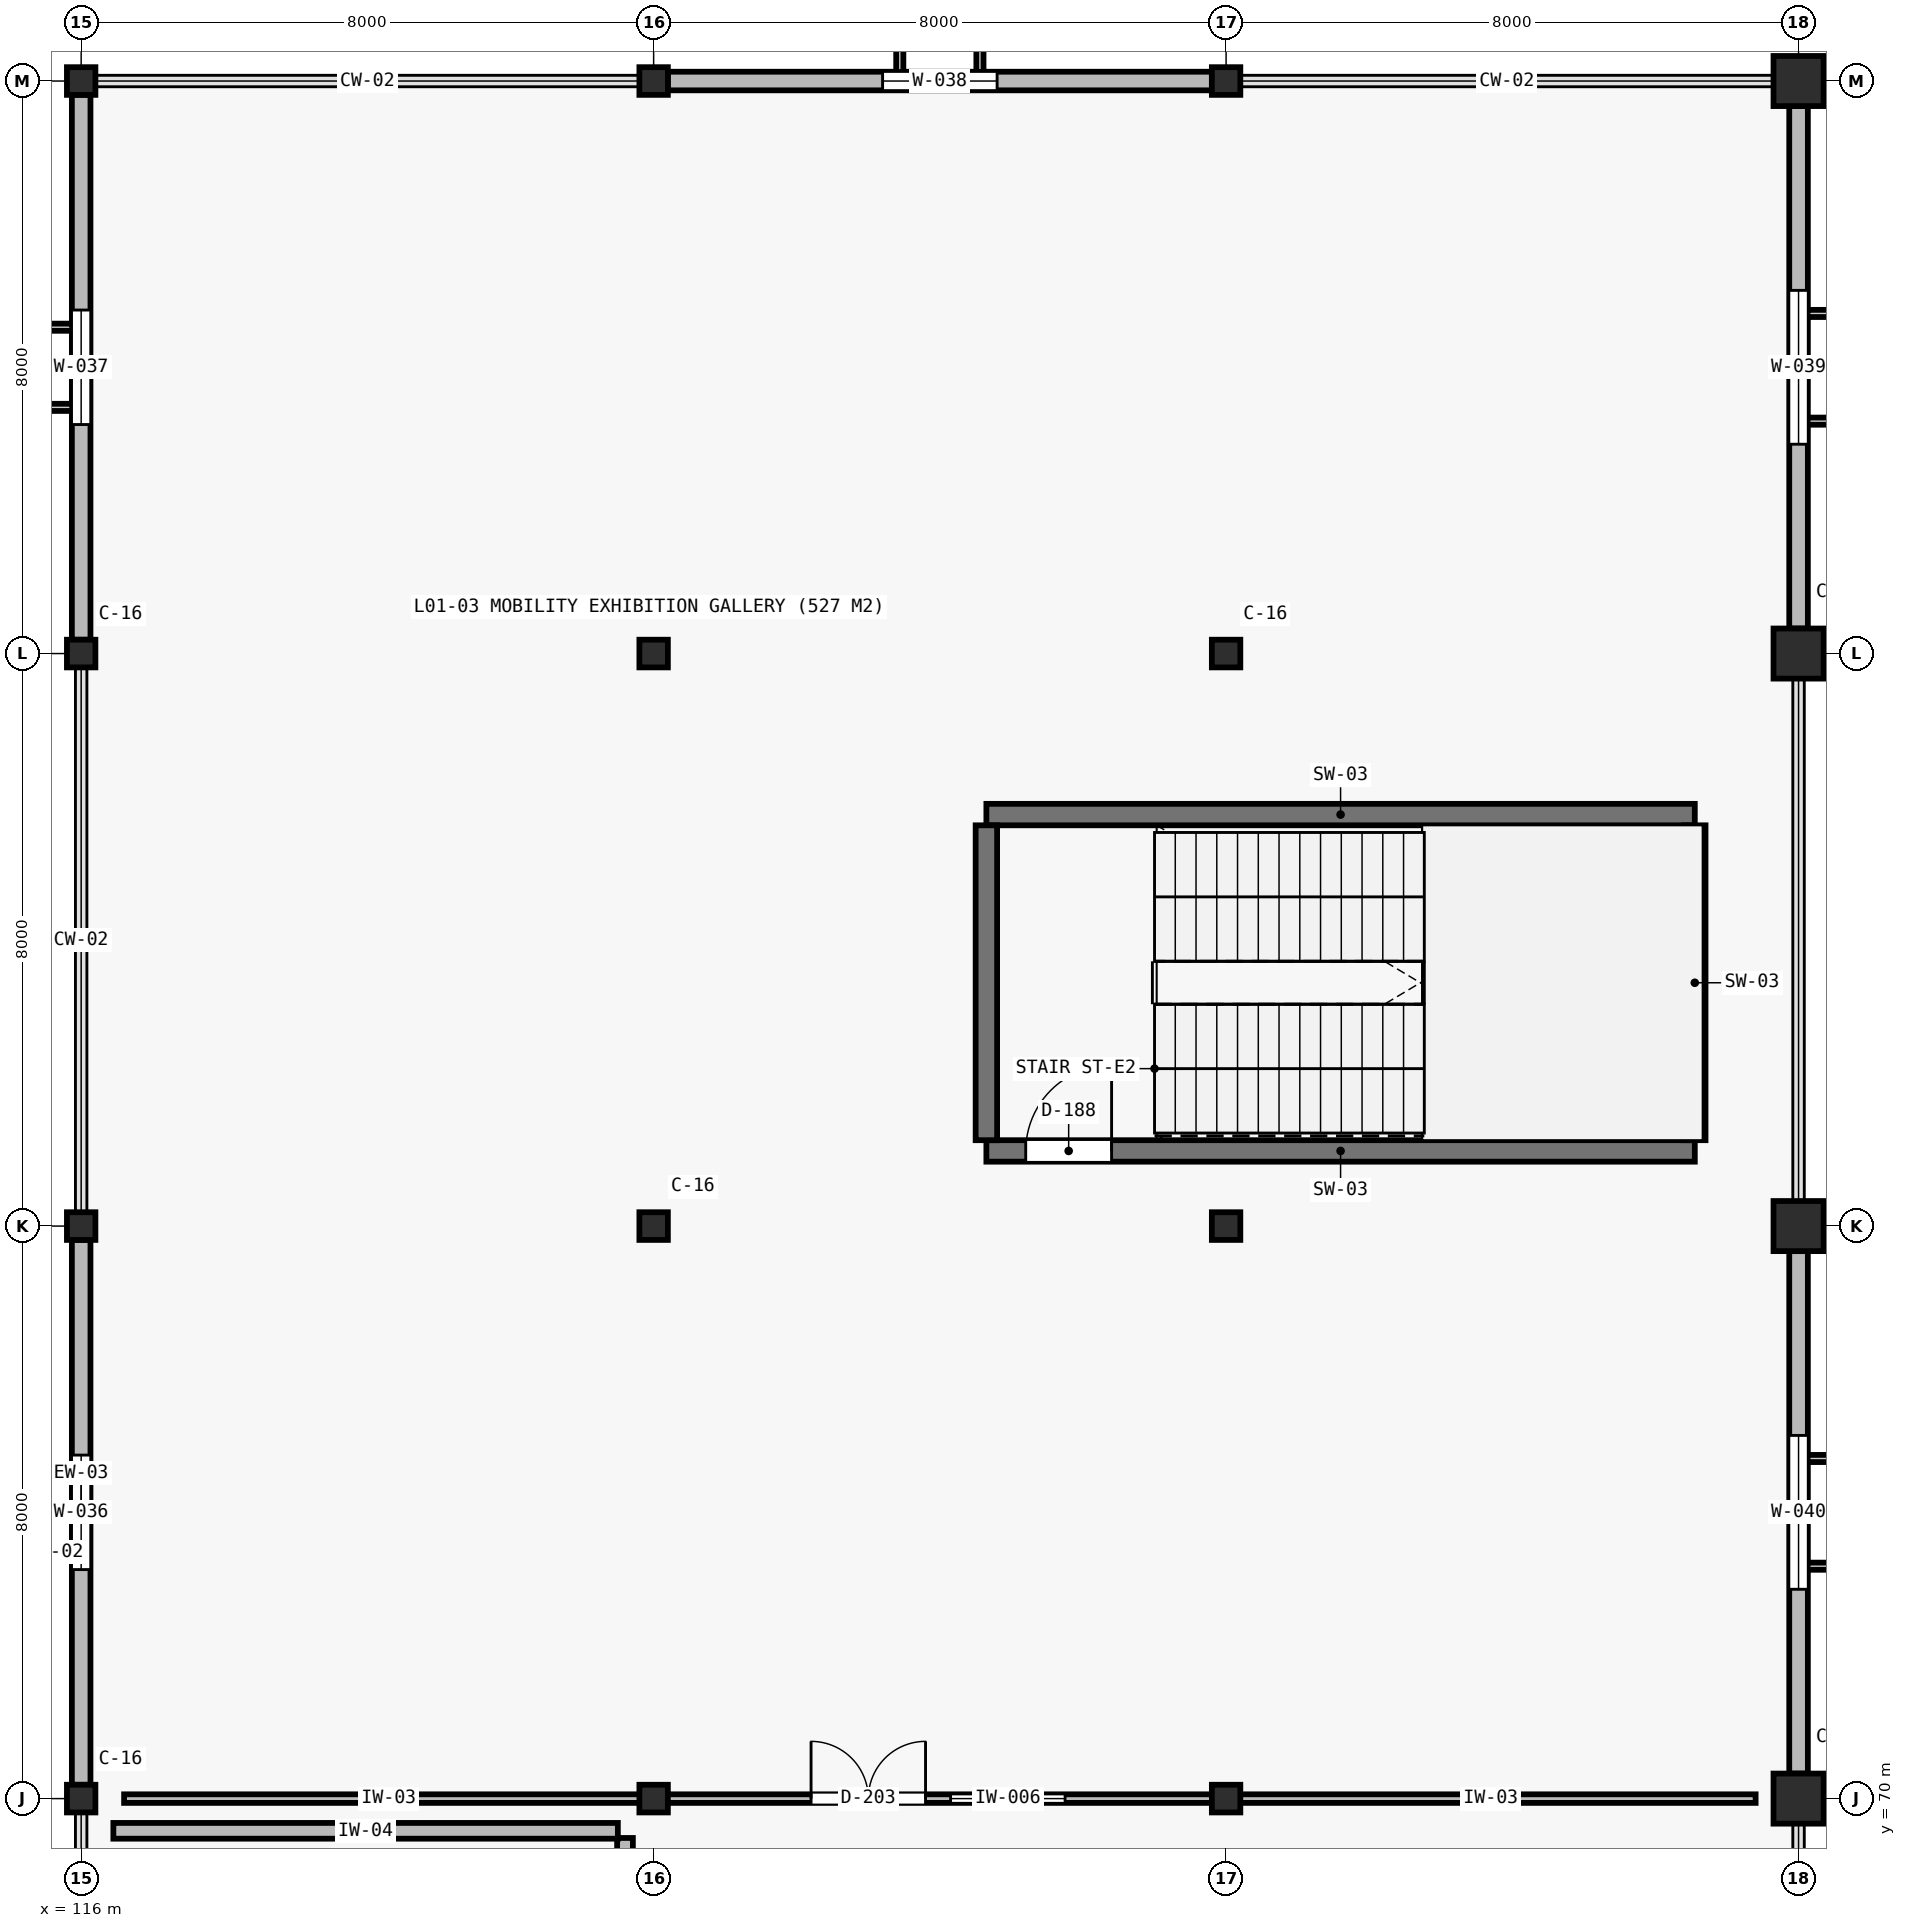
"""IFC4 building model, lengths in metres.
Left out: names, types, materials, properties, quantities, classifications, styles, units other than length and angle.
Written with IfcOpenShell. Run it as: python <this file> out.ifc"""

import sys

from ifc_helpers import new_model, si_unit, direction, frame, frame_2d, origin, origin_2d, place, context, subcontext, project, spatial, rectangle, i_section, extrude, element, fill, save


model = new_model("IFC4")
c1 = context("Model", 3, precision=1e-05, world=origin(), true_north=direction((0.0, 1.0)))
c2 = subcontext(c1, "Body", "Model", "MODEL_VIEW")
j1 = project(units=[si_unit("LENGTHUNIT", "METRE"), si_unit("PLANEANGLEUNIT", "RADIAN")], contexts=[c1])
p1 = place(None, origin())
s1 = spatial("IfcSite", under=j1, at=p1, CompositionType="ELEMENT")
p2 = place(p1, origin())
s2 = spatial("IfcBuilding", under=s1, at=p2, CompositionType="ELEMENT")
p3 = place(p2, frame((0.0, 0.0, 6.3)))
s3 = spatial("IfcBuildingStorey", under=s2, at=p3, CompositionType="ELEMENT", Elevation=6.3)
for number, where, z_axis, x_axis in (
    (1, (116.0, 70.0, 0.0), (0.0, 0.0, 1.0), (1.0, 0.0, 0.0)),
    (2, (116.0, 78.0, 0.0), (0.0, 0.0, 1.0), (1.0, 0.0, 0.0)),
    (3, (116.0, 86.0, 0.0), (0.0, 0.0, 1.0), (1.0, 0.0, 0.0)),
    (4, (116.0, 94.0, 0.0), (0.0, 0.0, 1.0), (1.0, 0.0, 0.0)),
    (5, (124.0, 70.0, 0.0), (0.0, 0.0, 1.0), (1.0, 0.0, 0.0)),
    (6, (124.0, 78.0, 0.0), (0.0, 0.0, 1.0), (1.0, 0.0, 0.0)),
    (7, (124.0, 86.0, 0.0), (0.0, 0.0, 1.0), (1.0, 0.0, 0.0)),
    (8, (124.0, 94.0, 0.0), (0.0, 0.0, 1.0), (1.0, 0.0, 0.0)),
    (9, (132.0, 70.0, 0.0), (0.0, 0.0, 1.0), (1.0, 0.0, 0.0)),
    (10, (132.0, 78.0, 0.0), (0.0, 0.0, 1.0), (1.0, 0.0, 0.0)),
    (11, (132.0, 86.0, 0.0), (0.0, 0.0, 1.0), (1.0, 0.0, 0.0)),
    (12, (132.0, 94.0, 0.0), (0.0, 0.0, 1.0), (1.0, 0.0, 0.0)),
):
    element("IfcColumn", number, at=place(p3, frame(where, z_axis=z_axis, x_axis=x_axis)), inside=s3, PredefinedType="COLUMN", context=c2, shape_type="SweptSolid", body=[
        extrude(i_section(OverallWidth=0.398, OverallDepth=0.387, WebThickness=0.021, FlangeThickness=0.033, at=origin_2d()), origin(), (0.0, 0.0, 1.0), 4.6),
    ])
for number, where, z_axis, x_axis in (
    (13, (140.0, 70.0, 0.0), (0.0, 0.0, 1.0), (1.0, 0.0, 0.0)),
    (14, (140.0, 78.0, 0.0), (0.0, 0.0, 1.0), (1.0, 0.0, 0.0)),
    (15, (140.0, 86.0, 0.0), (0.0, 0.0, 1.0), (1.0, 0.0, 0.0)),
    (16, (140.0, 94.0, 0.0), (0.0, 0.0, 1.0), (1.0, 0.0, 0.0)),
):
    element("IfcColumn", number, at=place(p3, frame(where, z_axis=z_axis, x_axis=x_axis)), inside=s3, PredefinedType="COLUMN", context=c2, shape_type="SweptSolid", body=[
        extrude(rectangle(XDim=0.7, YDim=0.7, at=origin_2d()), origin(), (0.0, 0.0, 1.0), 4.6),
    ])
p4 = place(p3, frame((128.65, 83.75, 0.0), z_axis=(0.0, 0.0, 1.0), x_axis=(1.0, 0.0, 0.0)))
e17 = element("IfcWall", 17, at=p4, inside=s3, PredefinedType="SHEAR", context=c2, shape_type="SweptSolid", body=[
    extrude(rectangle(XDim=9.9, YDim=0.3, at=frame_2d((4.95, 0.0))), origin(), (0.0, 0.0, 1.0), 4.6),
])
p5 = place(p3, frame((128.65, 79.05, 0.0), z_axis=(0.0, 0.0, 1.0), x_axis=(1.0, 0.0, 0.0)))
e18 = element("IfcWall", 18, at=p5, inside=s3, PredefinedType="SHEAR", context=c2, shape_type="SweptSolid", body=[
    extrude(rectangle(XDim=9.9, YDim=0.3, at=frame_2d((4.95, 0.0))), origin(), (0.0, 0.0, 1.0), 4.6),
])
p6 = place(p5, frame((0.55, 0.0, 0.0)))
e19 = element("IfcOpeningElement", 19, at=p6, cuts=e18, PredefinedType="OPENING", context=c2, shape_type="SweptSolid", body=[
    extrude(rectangle(XDim=1.2, YDim=2.2, at=frame_2d((0.6, 1.1))), frame((0.0, 0.16, 0.0), z_axis=(0.0, -1.0, 0.0), x_axis=(1.0, 0.0, 0.0)), (0.0, 0.0, 1.0), 0.32),
])
for number, where, z_axis, x_axis in (
    (20, (128.65, 79.2, 0.0), (0.0, 0.0, 1.0), (0.0, 1.0, 0.0)),
    (21, (138.55, 79.2, 0.0), (0.0, 0.0, 1.0), (0.0, 1.0, 0.0)),
):
    element("IfcWall", number, at=place(p3, frame(where, z_axis=z_axis, x_axis=x_axis)), inside=s3, PredefinedType="SHEAR", context=c2, shape_type="SweptSolid", body=[
        extrude(rectangle(XDim=4.4, YDim=0.3, at=frame_2d((2.2, 0.0))), origin(), (0.0, 0.0, 1.0), 4.6),
    ])
p7 = place(p3, frame((116.0, 70.194, 0.0), z_axis=(0.0, 0.0, 1.0), x_axis=(0.0, 1.0, 0.0)))
e22 = element("IfcWall", 22, at=p7, inside=s3, PredefinedType="STANDARD", context=c2, shape_type="SweptSolid", body=[
    extrude(rectangle(XDim=7.613, YDim=0.26, at=frame_2d((3.806, 0.0))), origin(), (0.0, 0.0, 1.0), 3.85),
])
p8 = place(p7, frame((3.007, 0.0, 0.95)))
e23 = element("IfcOpeningElement", 23, at=p8, cuts=e22, PredefinedType="OPENING", context=c2, shape_type="SweptSolid", body=[
    extrude(rectangle(XDim=1.6, YDim=2.2, at=frame_2d((0.8, 1.1))), frame((0.0, 0.14, 0.0), z_axis=(0.0, -1.0, 0.0), x_axis=(1.0, 0.0, 0.0)), (0.0, 0.0, 1.0), 0.28),
])
p9 = place(p3, frame((116.0, 86.194, 0.0), z_axis=(0.0, 0.0, 1.0), x_axis=(0.0, 1.0, 0.0)))
e24 = element("IfcWall", 24, at=p9, inside=s3, PredefinedType="STANDARD", context=c2, shape_type="SweptSolid", body=[
    extrude(rectangle(XDim=7.613, YDim=0.26, at=frame_2d((3.806, 0.0))), origin(), (0.0, 0.0, 1.0), 3.85),
])
p10 = place(p9, frame((3.007, 0.0, 0.95)))
e25 = element("IfcOpeningElement", 25, at=p10, cuts=e24, PredefinedType="OPENING", context=c2, shape_type="SweptSolid", body=[
    extrude(rectangle(XDim=1.6, YDim=2.2, at=frame_2d((0.8, 1.1))), frame((0.0, 0.14, 0.0), z_axis=(0.0, -1.0, 0.0), x_axis=(1.0, 0.0, 0.0)), (0.0, 0.0, 1.0), 0.28),
])
p11 = place(p3, frame((124.199, 94.0, 0.0), z_axis=(0.0, 0.0, 1.0), x_axis=(1.0, 0.0, 0.0)))
e26 = element("IfcWall", 26, at=p11, inside=s3, PredefinedType="STANDARD", context=c2, shape_type="SweptSolid", body=[
    extrude(rectangle(XDim=7.602, YDim=0.26, at=frame_2d((3.801, 0.0))), origin(), (0.0, 0.0, 1.0), 3.85),
])
p12 = place(p11, frame((3.001, 0.0, 0.95)))
e27 = element("IfcOpeningElement", 27, at=p12, cuts=e26, PredefinedType="OPENING", context=c2, shape_type="SweptSolid", body=[
    extrude(rectangle(XDim=1.6, YDim=2.2, at=frame_2d((0.8, 1.1))), frame((0.0, 0.14, 0.0), z_axis=(0.0, -1.0, 0.0), x_axis=(1.0, 0.0, 0.0)), (0.0, 0.0, 1.0), 0.28),
])
p13 = place(p3, frame((140.0, 93.65, 0.0), z_axis=(0.0, 0.0, 1.0), x_axis=(0.0, -1.0, 0.0)))
e28 = element("IfcWall", 28, at=p13, inside=s3, PredefinedType="STANDARD", context=c2, shape_type="SweptSolid", body=[
    extrude(rectangle(XDim=7.3, YDim=0.26, at=frame_2d((3.65, 0.0))), origin(), (0.0, 0.0, 1.0), 3.85),
])
p14 = place(p13, frame((2.575, 0.0, 0.95)))
e29 = element("IfcOpeningElement", 29, at=p14, cuts=e28, PredefinedType="OPENING", context=c2, shape_type="SweptSolid", body=[
    extrude(rectangle(XDim=2.15, YDim=1.5, at=frame_2d((1.075, 0.75))), frame((0.0, 0.14, 0.0), z_axis=(0.0, -1.0, 0.0), x_axis=(1.0, 0.0, 0.0)), (0.0, 0.0, 1.0), 0.28),
])
p15 = place(p3, frame((140.0, 77.65, 0.0), z_axis=(0.0, 0.0, 1.0), x_axis=(0.0, -1.0, 0.0)))
e30 = element("IfcWall", 30, at=p15, inside=s3, PredefinedType="STANDARD", context=c2, shape_type="SweptSolid", body=[
    extrude(rectangle(XDim=7.3, YDim=0.26, at=frame_2d((3.65, 0.0))), origin(), (0.0, 0.0, 1.0), 3.85),
])
p16 = place(p15, frame((2.575, 0.0, 0.95)))
e31 = element("IfcOpeningElement", 31, at=p16, cuts=e30, PredefinedType="OPENING", context=c2, shape_type="SweptSolid", body=[
    extrude(rectangle(XDim=2.15, YDim=1.5, at=frame_2d((1.075, 0.75))), frame((0.0, 0.14, 0.0), z_axis=(0.0, -1.0, 0.0), x_axis=(1.0, 0.0, 0.0)), (0.0, 0.0, 1.0), 0.28),
])
p17 = place(p3, frame((123.6, 62.55, 0.0), z_axis=(0.0, 0.0, 1.0), x_axis=(0.0, 1.0, 0.0)))
e32 = element("IfcWall", 32, at=p17, inside=s3, PredefinedType="PLUMBINGWALL", context=c2, shape_type="SweptSolid", body=[
    extrude(rectangle(XDim=6.9, YDim=0.22, at=frame_2d((3.45, 0.0))), origin(), (0.0, 0.0, 1.0), 4.6),
])
p18 = place(p17, frame((0.65, 0.0, 0.0)))
e33 = element("IfcOpeningElement", 33, at=p18, cuts=e32, PredefinedType="OPENING", context=c2, shape_type="SweptSolid", body=[
    extrude(rectangle(XDim=0.95, YDim=2.1, at=frame_2d((0.475, 1.05))), frame((0.0, 0.12, 0.0), z_axis=(0.0, -1.0, 0.0), x_axis=(1.0, 0.0, 0.0)), (0.0, 0.0, 1.0), 0.24),
])
p19 = place(p17, frame((3.1, 0.0, 0.0)))
e34 = element("IfcOpeningElement", 34, at=p19, cuts=e32, PredefinedType="OPENING", context=c2, shape_type="SweptSolid", body=[
    extrude(rectangle(XDim=0.9, YDim=2.1, at=frame_2d((0.45, 1.05))), frame((0.0, 0.12, 0.0), z_axis=(0.0, -1.0, 0.0), x_axis=(1.0, 0.0, 0.0)), (0.0, 0.0, 1.0), 0.24),
])
p20 = place(p17, frame((5.2, 0.0, 0.0)))
e35 = element("IfcOpeningElement", 35, at=p20, cuts=e32, PredefinedType="OPENING", context=c2, shape_type="SweptSolid", body=[
    extrude(rectangle(XDim=0.9, YDim=2.1, at=frame_2d((0.45, 1.05))), frame((0.0, 0.12, 0.0), z_axis=(0.0, -1.0, 0.0), x_axis=(1.0, 0.0, 0.0)), (0.0, 0.0, 1.0), 0.24),
])
p21 = place(p3, frame((116.45, 69.55, 0.0), z_axis=(0.0, 0.0, 1.0), x_axis=(1.0, 0.0, 0.0)))
e36 = element("IfcWall", 36, at=p21, inside=s3, PredefinedType="PLUMBINGWALL", context=c2, shape_type="SweptSolid", body=[
    extrude(rectangle(XDim=7.05, YDim=0.22, at=frame_2d((3.525, 0.0))), origin(), (0.0, 0.0, 1.0), 4.6),
])
p22 = place(p3, frame((116.6, 70.0, 0.0), z_axis=(0.0, 0.0, 1.0), x_axis=(1.0, 0.0, 0.0)))
e37 = element("IfcWall", 37, at=p22, inside=s3, PredefinedType="PARTITIONING", context=c2, shape_type="SweptSolid", body=[
    extrude(rectangle(XDim=7.4, YDim=0.12, at=frame_2d((3.7, 0.0))), origin(), (0.0, 0.0, 1.0), 3.85),
])
p23 = place(p3, frame((124.0, 70.0, 0.0), z_axis=(0.0, 0.0, 1.0), x_axis=(1.0, 0.0, 0.0)))
e38 = element("IfcWall", 38, at=p23, inside=s3, PredefinedType="PARTITIONING", context=c2, shape_type="SweptSolid", body=[
    extrude(rectangle(XDim=8.0, YDim=0.12, at=frame_2d((4.0, 0.0))), origin(), (0.0, 0.0, 1.0), 3.988),
])
p24 = place(p23, frame((2.2, 0.0, 0.0)))
e39 = element("IfcOpeningElement", 39, at=p24, cuts=e38, PredefinedType="OPENING", context=c2, shape_type="SweptSolid", body=[
    extrude(rectangle(XDim=1.6, YDim=2.2, at=frame_2d((0.8, 1.1))), frame((0.0, 0.07, 0.0), z_axis=(0.0, -1.0, 0.0), x_axis=(1.0, 0.0, 0.0)), (0.0, 0.0, 1.0), 0.14),
])
p25 = place(p23, frame((4.15, 0.0, 0.95)))
e40 = element("IfcOpeningElement", 40, at=p25, cuts=e38, PredefinedType="OPENING", context=c2, shape_type="SweptSolid", body=[
    extrude(rectangle(XDim=1.6, YDim=1.3, at=frame_2d((0.8, 0.65))), frame((0.0, 0.07, 0.0), z_axis=(0.0, -1.0, 0.0), x_axis=(1.0, 0.0, 0.0)), (0.0, 0.0, 1.0), 0.14),
])
p26 = place(p3, frame((132.0, 70.0, 0.0), z_axis=(0.0, 0.0, 1.0), x_axis=(1.0, 0.0, 0.0)))
e41 = element("IfcWall", 41, at=p26, inside=s3, PredefinedType="PARTITIONING", context=c2, shape_type="SweptSolid", body=[
    extrude(rectangle(XDim=7.4, YDim=0.12, at=frame_2d((3.7, 0.0))), origin(), (0.0, 0.0, 1.0), 3.85),
])
p27 = place(p8, origin())
e42 = element("IfcWindow", 42, at=p27, inside=s3, PartitioningType="SINGLE_PANEL", PredefinedType="WINDOW", context=c2, shape_type="SweptSolid", body=[
    extrude(rectangle(XDim=1.6, YDim=2.2, at=frame_2d((0.8, 1.1))), frame((0.0, 0.03, 0.0), z_axis=(0.0, -1.0, 0.0), x_axis=(1.0, 0.0, 0.0)), (0.0, 0.0, 1.0), 0.06),
])
fill(e23, e42)
p28 = place(p10, origin())
e43 = element("IfcWindow", 43, at=p28, inside=s3, PartitioningType="SINGLE_PANEL", PredefinedType="WINDOW", context=c2, shape_type="SweptSolid", body=[
    extrude(rectangle(XDim=1.6, YDim=2.2, at=frame_2d((0.8, 1.1))), frame((0.0, 0.03, 0.0), z_axis=(0.0, -1.0, 0.0), x_axis=(1.0, 0.0, 0.0)), (0.0, 0.0, 1.0), 0.06),
])
fill(e25, e43)
p29 = place(p12, origin())
e44 = element("IfcWindow", 44, at=p29, inside=s3, PartitioningType="SINGLE_PANEL", PredefinedType="WINDOW", context=c2, shape_type="SweptSolid", body=[
    extrude(rectangle(XDim=1.6, YDim=2.2, at=frame_2d((0.8, 1.1))), frame((0.0, 0.03, 0.0), z_axis=(0.0, -1.0, 0.0), x_axis=(1.0, 0.0, 0.0)), (0.0, 0.0, 1.0), 0.06),
])
fill(e27, e44)
p30 = place(p14, origin())
e45 = element("IfcWindow", 45, at=p30, inside=s3, PartitioningType="SINGLE_PANEL", PredefinedType="WINDOW", context=c2, shape_type="SweptSolid", body=[
    extrude(rectangle(XDim=2.15, YDim=1.5, at=frame_2d((1.075, 0.75))), frame((0.0, 0.03, 0.0), z_axis=(0.0, -1.0, 0.0), x_axis=(1.0, 0.0, 0.0)), (0.0, 0.0, 1.0), 0.06),
])
fill(e29, e45)
p31 = place(p16, origin())
e46 = element("IfcWindow", 46, at=p31, inside=s3, PartitioningType="SINGLE_PANEL", PredefinedType="WINDOW", context=c2, shape_type="SweptSolid", body=[
    extrude(rectangle(XDim=2.15, YDim=1.5, at=frame_2d((1.075, 0.75))), frame((0.0, 0.03, 0.0), z_axis=(0.0, -1.0, 0.0), x_axis=(1.0, 0.0, 0.0)), (0.0, 0.0, 1.0), 0.06),
])
fill(e31, e46)
p32 = place(p6, origin())
e47 = element("IfcDoor", 47, at=p32, inside=s3, OperationType="SINGLE_SWING_RIGHT", PredefinedType="DOOR", context=c2, shape_type="SweptSolid", body=[
    extrude(rectangle(XDim=1.2, YDim=2.2, at=frame_2d((0.6, 1.1))), frame((0.0, 0.025, 0.0), z_axis=(0.0, -1.0, 0.0), x_axis=(1.0, 0.0, 0.0)), (0.0, 0.0, 1.0), 0.05),
])
fill(e19, e47)
p33 = place(p24, origin())
e48 = element("IfcDoor", 48, at=p33, inside=s3, OperationType="DOUBLE_DOOR_SINGLE_SWING", PredefinedType="DOOR", context=c2, shape_type="SweptSolid", body=[
    extrude(rectangle(XDim=1.6, YDim=2.2, at=frame_2d((0.8, 1.1))), frame((0.0, 0.025, 0.0), z_axis=(0.0, -1.0, 0.0), x_axis=(1.0, 0.0, 0.0)), (0.0, 0.0, 1.0), 0.05),
])
fill(e39, e48)
p34 = place(p25, origin())
e49 = element("IfcWindow", 49, at=p34, inside=s3, PartitioningType="SINGLE_PANEL", PredefinedType="WINDOW", context=c2, shape_type="SweptSolid", body=[
    extrude(rectangle(XDim=1.6, YDim=1.3, at=frame_2d((0.8, 0.65))), frame((0.0, 0.03, 0.0), z_axis=(0.0, -1.0, 0.0), x_axis=(1.0, 0.0, 0.0)), (0.0, 0.0, 1.0), 0.06),
])
fill(e40, e49)
save(model, sys.argv[1])
